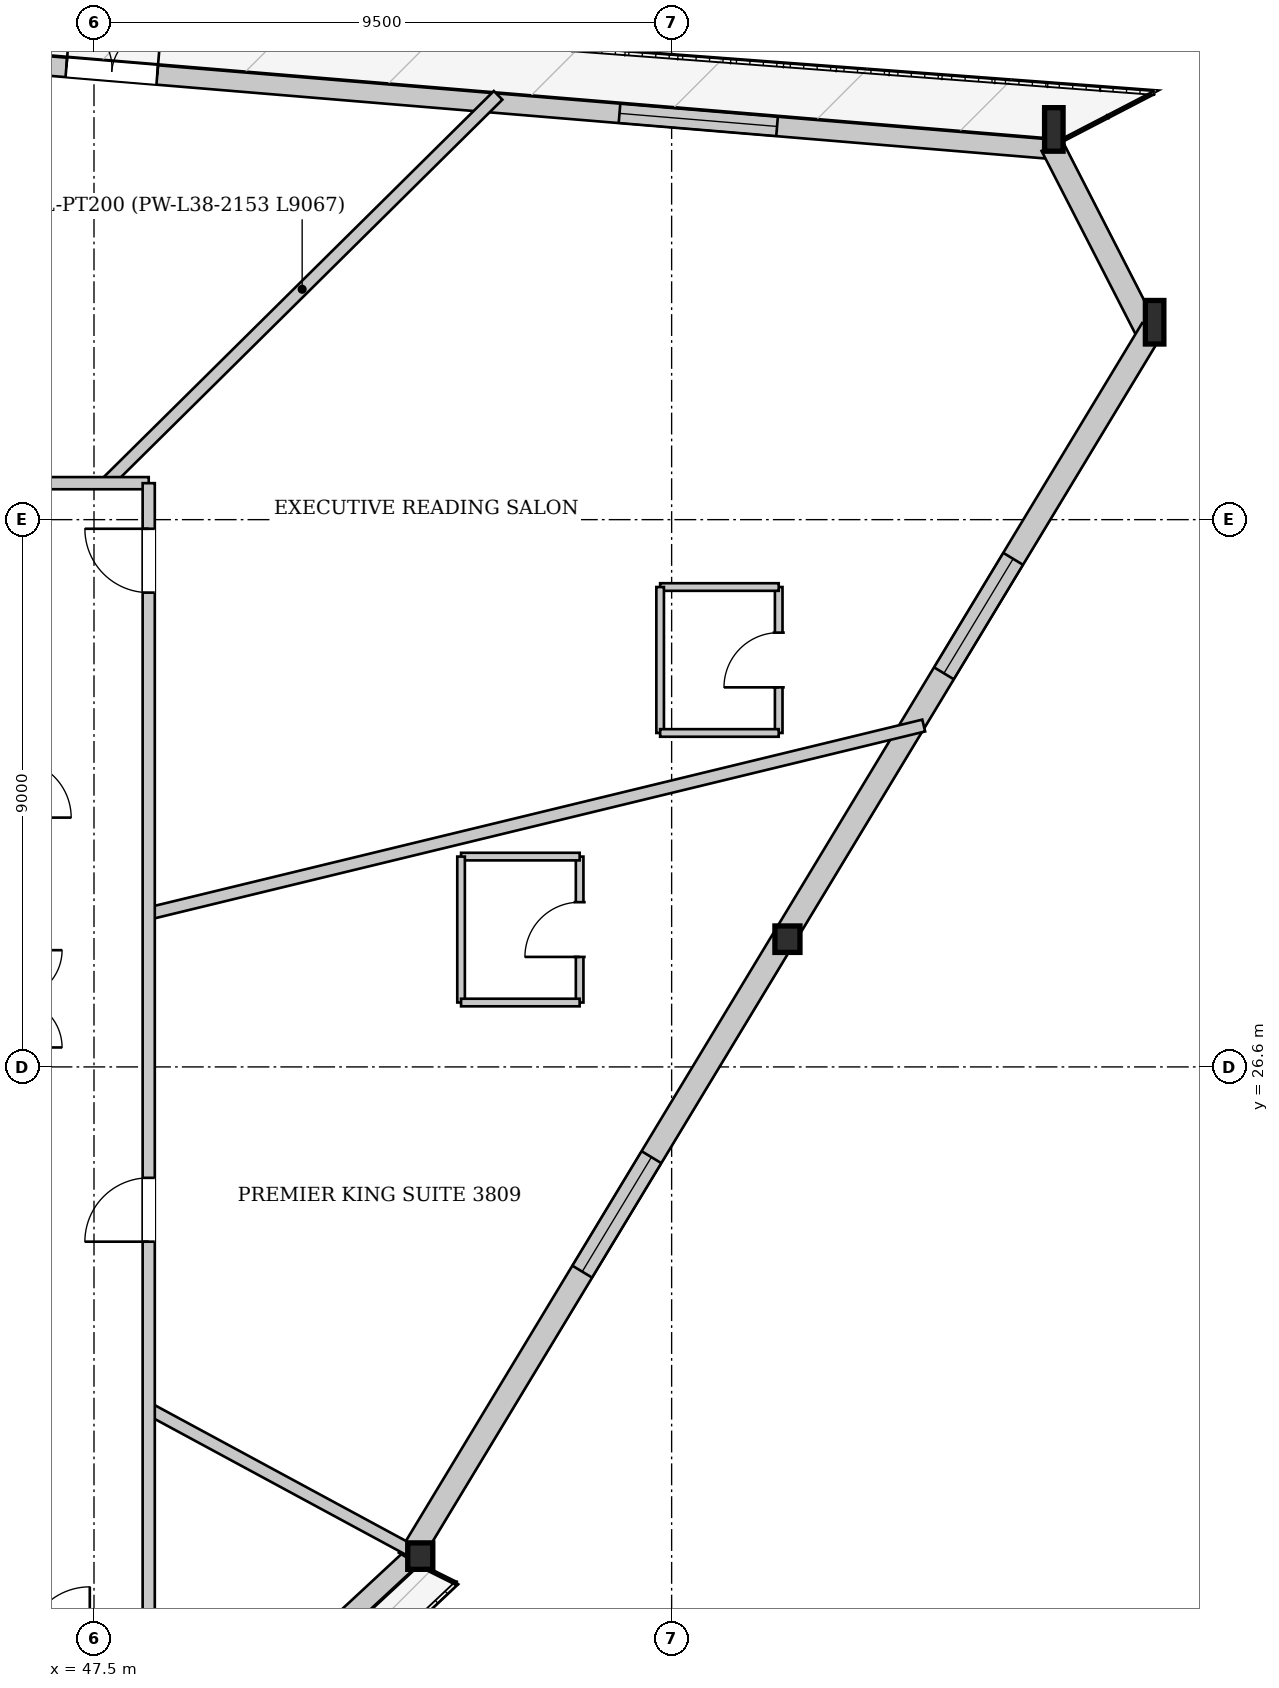
"""IFC4 building model, lengths in metres.
Left out: names, types, materials, properties, quantities, classifications, styles, units other than length and angle.
Written with IfcOpenShell. Run it as: python <this file> out.ifc"""

import sys

from ifc_helpers import new_model, si_unit, direction, frame, frame_2d, origin, origin_2d, place, context, subcontext, project, spatial, rectangle, i_section, extrude, source, transform, mapped, element, fill, save


model = new_model("IFC4")
c1 = context("Model", 3, precision=1e-05, world=origin(), true_north=direction((0.0, 1.0)))
c2 = subcontext(c1, "Body", "Model", "MODEL_VIEW")
j1 = project(units=[si_unit("LENGTHUNIT", "METRE"), si_unit("PLANEANGLEUNIT", "RADIAN")], contexts=[c1])
p1 = place(None, origin())
s1 = spatial("IfcSite", under=j1, at=p1, CompositionType="ELEMENT")
p2 = place(p1, origin())
s2 = spatial("IfcBuilding", under=s1, at=p2, CompositionType="ELEMENT")
p3 = place(p2, frame((0.0, 0.0, 146.6)))
s3 = spatial("IfcBuildingStorey", under=s2, at=p3, CompositionType="ELEMENT", Elevation=146.6)
m1 = source(origin(), c2, "Body", "SweptSolid", [
    extrude(i_section(OverallWidth=0.304, OverallDepth=0.716, WebThickness=0.021, FlangeThickness=0.04, at=origin_2d()), origin(), (0.0, 0.0, 1.0), 3.419),
])
p4 = place(p3, frame((65.063, 38.637, 0.0), z_axis=(-0.070258016221, 0.122594526272, 0.989966864741), x_axis=(-0.867620537636, -0.497226912658, 0.0)))
e1 = element("IfcColumn", 1, at=p4, inside=s3, PredefinedType="COLUMN", context=c2, shape_type="MappedRepresentation", body=[
    mapped(m1, transform((0.0, 0.0, 0.0), x_axis=(1.0, 0.0, 0.0), y_axis=(0.0, 1.0, 0.0), z_axis=(0.0, 0.0, 1.0), scale=1.0)),
])
m2 = source(origin(), c2, "Body", "SweptSolid", [
    extrude(i_section(OverallWidth=0.304, OverallDepth=0.716, WebThickness=0.021, FlangeThickness=0.04, at=origin_2d()), origin(), (0.0, 0.0, 1.0), 3.415),
])
p5 = place(p3, frame((63.422, 41.837, 0.0), z_axis=(-0.079785459835, 0.105236735552, 0.991241398394), x_axis=(-0.796871005575, -0.604149485205, 0.0)))
e2 = element("IfcColumn", 2, at=p5, inside=s3, PredefinedType="COLUMN", context=c2, shape_type="MappedRepresentation", body=[
    mapped(m2, transform((0.0, 0.0, 0.0), x_axis=(1.0, 0.0, 0.0), y_axis=(0.0, 1.0, 0.0), z_axis=(0.0, 0.0, 1.0), scale=1.0)),
])
m3 = source(origin(), c2, "Body", "SweptSolid", [
    extrude(i_section(OverallWidth=0.412, OverallDepth=0.435, WebThickness=0.031, FlangeThickness=0.05, at=origin_2d()), origin(), (0.0, 0.0, 1.0), 3.397),
])
p6 = place(p3, frame((52.839, 18.415, 0.0), z_axis=(0.016098414869, 0.082648112052, 0.996448759652), x_axis=(-0.981553147676, 0.191189482678, 0.0)))
e3 = element("IfcColumn", 3, at=p6, inside=s3, PredefinedType="COLUMN", context=c2, shape_type="MappedRepresentation", body=[
    mapped(m3, transform((0.0, 0.0, 0.0), x_axis=(1.0, 0.0, 0.0), y_axis=(0.0, 1.0, 0.0), z_axis=(0.0, 0.0, 1.0), scale=1.0)),
])
m4 = source(origin(), c2, "Body", "SweptSolid", [
    extrude(i_section(OverallWidth=0.412, OverallDepth=0.435, WebThickness=0.031, FlangeThickness=0.05, at=origin_2d()), origin(), (0.0, 0.0, 1.0), 3.404),
])
p7 = place(p3, frame((58.951, 28.526, 0.0), z_axis=(-0.027251595149, 0.102838914326, 0.994324649328), x_axis=(-0.966636531307, -0.256151939956, 0.0)))
e4 = element("IfcColumn", 4, at=p7, inside=s3, PredefinedType="COLUMN", context=c2, shape_type="MappedRepresentation", body=[
    mapped(m4, transform((0.0, 0.0, 0.0), x_axis=(1.0, 0.0, 0.0), y_axis=(0.0, 1.0, 0.0), z_axis=(0.0, 0.0, 1.0), scale=1.0)),
])
p8 = place(p3, frame((52.73, 18.532, 0.0), z_axis=(0.0, 0.0, 1.0), x_axis=(-0.73309626957, -0.680124885255, 0.0)))
e5 = element("IfcWall", 5, at=p8, inside=s3, PredefinedType="SOLIDWALL", context=c2, shape_type="SweptSolid", body=[
    extrude(rectangle(XDim=23.63, YDim=0.32, at=frame_2d((11.815, 0.0))), origin(), (0.0, 0.0, 1.0), 2.692),
])
p9 = place(p8, frame((6.812, 0.0, 0.0)))
e6 = element("IfcOpeningElement", 6, at=p9, cuts=e5, PredefinedType="OPENING", context=c2, shape_type="SweptSolid", body=[
    extrude(rectangle(XDim=1.5, YDim=2.3, at=frame_2d((0.75, 1.15))), frame((0.0, 0.17, 0.0), z_axis=(0.0, -1.0, 0.0), x_axis=(1.0, 0.0, 0.0)), (0.0, 0.0, 1.0), 0.34),
])
p10 = place(p8, frame((16.186, 0.0, 0.25)))
e7 = element("IfcOpeningElement", 7, at=p10, cuts=e5, PredefinedType="OPENING", context=c2, shape_type="SweptSolid", body=[
    extrude(rectangle(XDim=2.6, YDim=2.35, at=frame_2d((1.3, 1.175))), frame((0.0, 0.17, 0.0), z_axis=(0.0, -1.0, 0.0), x_axis=(1.0, 0.0, 0.0)), (0.0, 0.0, 1.0), 0.34),
])
p11 = place(p3, frame((40.444, 43.585, 0.0), z_axis=(0.0, 0.0, 1.0), x_axis=(0.996570046252, -0.08275350695, 0.0)))
e8 = element("IfcWall", 8, at=p11, inside=s3, PredefinedType="SOLIDWALL", context=c2, shape_type="SweptSolid", body=[
    extrude(rectangle(XDim=23.044, YDim=0.32, at=frame_2d((11.522, 0.0))), origin(), (0.0, 0.0, 1.0), 2.692),
])
p12 = place(p11, frame((6.624, 0.0, 0.0)))
e9 = element("IfcOpeningElement", 9, at=p12, cuts=e8, PredefinedType="OPENING", context=c2, shape_type="SweptSolid", body=[
    extrude(rectangle(XDim=1.5, YDim=2.3, at=frame_2d((0.75, 1.15))), frame((0.0, 0.17, 0.0), z_axis=(0.0, -1.0, 0.0), x_axis=(1.0, 0.0, 0.0)), (0.0, 0.0, 1.0), 0.34),
])
p13 = place(p11, frame((15.753, 0.0, 0.25)))
e10 = element("IfcOpeningElement", 10, at=p13, cuts=e8, PredefinedType="OPENING", context=c2, shape_type="SweptSolid", body=[
    extrude(rectangle(XDim=2.6, YDim=2.35, at=frame_2d((1.3, 1.175))), frame((0.0, 0.17, 0.0), z_axis=(0.0, -1.0, 0.0), x_axis=(1.0, 0.0, 0.0)), (0.0, 0.0, 1.0), 0.34),
])
p14 = place(p3, frame((63.253, 41.751, 0.0), z_axis=(0.0, 0.0, 1.0), x_axis=(0.456338692797, -0.889806157237, 0.0)))
e11 = element("IfcWall", 11, at=p14, inside=s3, PredefinedType="SOLIDWALL", context=c2, shape_type="SweptSolid", body=[
    extrude(rectangle(XDim=3.597, YDim=0.38, at=frame_2d((1.799, 0.0))), origin(), (0.0, 0.0, 1.0), 2.692),
])
p15 = place(p3, frame((64.901, 38.735, 0.0), z_axis=(0.0, 0.0, 1.0), x_axis=(-0.517346318523, -0.855776131188, 0.0)))
e12 = element("IfcWall", 12, at=p15, inside=s3, PredefinedType="SOLIDWALL", context=c2, shape_type="SweptSolid", body=[
    extrude(rectangle(XDim=23.63, YDim=0.38, at=frame_2d((11.815, 0.0))), origin(), (0.0, 0.0, 1.0), 2.692),
])
p16 = place(p15, frame((4.416, 0.0, 0.322)))
e13 = element("IfcOpeningElement", 13, at=p16, cuts=e12, PredefinedType="OPENING", context=c2, shape_type="SweptSolid", body=[
    extrude(rectangle(XDim=2.2, YDim=2.25, at=frame_2d((1.1, 1.125))), frame((0.0, 0.2, 0.0), z_axis=(0.0, -1.0, 0.0), x_axis=(1.0, 0.0, 0.0)), (0.0, 0.0, 1.0), 0.4),
])
p17 = place(p15, frame((15.914, 0.0, 0.322)))
e14 = element("IfcOpeningElement", 14, at=p17, cuts=e12, PredefinedType="OPENING", context=c2, shape_type="SweptSolid", body=[
    extrude(rectangle(XDim=2.2, YDim=2.25, at=frame_2d((1.1, 1.125))), frame((0.0, 0.2, 0.0), z_axis=(0.0, -1.0, 0.0), x_axis=(1.0, 0.0, 0.0)), (0.0, 0.0, 1.0), 0.4),
])
p18 = place(p3, frame((47.701, 36.2, 0.0), z_axis=(0.0, 0.0, 1.0), x_axis=(0.710799449418, 0.703394727523, 0.0)))
e15 = element("IfcWall", 15, at=p18, inside=s3, PredefinedType="PARTITIONING", context=c2, shape_type="SweptSolid", body=[
    extrude(rectangle(XDim=9.067, YDim=0.2, at=frame_2d((4.533, 0.0))), origin(), (0.0, 0.0, 1.0), 3.3),
])
p19 = place(p3, frame((48.4, 20.978, 0.0), z_axis=(0.0, 0.0, 1.0), x_axis=(0.879687571987, -0.475552074638, 0.0)))
e16 = element("IfcWall", 16, at=p19, inside=s3, PredefinedType="PARTITIONING", context=c2, shape_type="SweptSolid", body=[
    extrude(rectangle(XDim=5.101, YDim=0.2, at=frame_2d((2.55, 0.0))), origin(), (0.0, 0.0, 1.0), 2.835),
])
p20 = place(p3, frame((48.4, 29.123, 0.0), z_axis=(0.0, 0.0, 1.0), x_axis=(0.971821296389, 0.235718832267, 0.0)))
e17 = element("IfcWall", 17, at=p20, inside=s3, PredefinedType="PARTITIONING", context=c2, shape_type="SweptSolid", body=[
    extrude(rectangle(XDim=13.115, YDim=0.2, at=frame_2d((6.558, 0.0))), origin(), (0.0, 0.0, 1.0), 3.3),
])
p21 = place(p3, frame((55.487, 27.659, 0.0), z_axis=(0.0, 0.0, 1.0), x_axis=(0.0, 1.0, 0.0)))
e18 = element("IfcWall", 18, at=p21, inside=s3, PredefinedType="PARTITIONING", context=c2, shape_type="SweptSolid", body=[
    extrude(rectangle(XDim=2.4, YDim=0.125, at=frame_2d((1.2, 0.0))), origin(), (0.0, 0.0, 1.0), 3.3),
])
p22 = place(p21, frame((0.75, 0.0, 0.0)))
e19 = element("IfcOpeningElement", 19, at=p22, cuts=e18, PredefinedType="OPENING", context=c2, shape_type="SweptSolid", body=[
    extrude(rectangle(XDim=0.9, YDim=2.1, at=frame_2d((0.45, 1.05))), frame((0.0, 0.073, 0.0), z_axis=(0.0, -1.0, 0.0), x_axis=(1.0, 0.0, 0.0)), (0.0, 0.0, 1.0), 0.145),
])
p23 = place(p3, frame((55.487, 30.059, 0.0), z_axis=(0.0, 0.0, 1.0), x_axis=(-1.0, 0.0, 0.0)))
e20 = element("IfcWall", 20, at=p23, inside=s3, PredefinedType="PARTITIONING", context=c2, shape_type="SweptSolid", body=[
    extrude(rectangle(XDim=1.95, YDim=0.125, at=frame_2d((0.975, 0.0))), origin(), (0.0, 0.0, 1.0), 3.3),
])
p24 = place(p3, frame((53.537, 30.059, 0.0), z_axis=(0.0, 0.0, 1.0), x_axis=(0.0, -1.0, 0.0)))
e21 = element("IfcWall", 21, at=p24, inside=s3, PredefinedType="PARTITIONING", context=c2, shape_type="SweptSolid", body=[
    extrude(rectangle(XDim=2.4, YDim=0.125, at=frame_2d((1.2, 0.0))), origin(), (0.0, 0.0, 1.0), 3.3),
])
p25 = place(p3, frame((53.537, 27.659, 0.0), z_axis=(0.0, 0.0, 1.0), x_axis=(1.0, 0.0, 0.0)))
e22 = element("IfcWall", 22, at=p25, inside=s3, PredefinedType="PARTITIONING", context=c2, shape_type="SweptSolid", body=[
    extrude(rectangle(XDim=1.95, YDim=0.125, at=frame_2d((0.975, 0.0))), origin(), (0.0, 0.0, 1.0), 3.3),
])
p26 = place(p3, frame((58.761, 32.092, 0.0), z_axis=(0.0, 0.0, 1.0), x_axis=(0.0, 1.0, 0.0)))
e23 = element("IfcWall", 23, at=p26, inside=s3, PredefinedType="PARTITIONING", context=c2, shape_type="SweptSolid", body=[
    extrude(rectangle(XDim=2.4, YDim=0.125, at=frame_2d((1.2, 0.0))), origin(), (0.0, 0.0, 1.0), 3.3),
])
p27 = place(p26, frame((0.75, 0.0, 0.0)))
e24 = element("IfcOpeningElement", 24, at=p27, cuts=e23, PredefinedType="OPENING", context=c2, shape_type="SweptSolid", body=[
    extrude(rectangle(XDim=0.9, YDim=2.1, at=frame_2d((0.45, 1.05))), frame((0.0, 0.073, 0.0), z_axis=(0.0, -1.0, 0.0), x_axis=(1.0, 0.0, 0.0)), (0.0, 0.0, 1.0), 0.145),
])
p28 = place(p3, frame((58.761, 34.492, 0.0), z_axis=(0.0, 0.0, 1.0), x_axis=(-1.0, 0.0, 0.0)))
e25 = element("IfcWall", 25, at=p28, inside=s3, PredefinedType="PARTITIONING", context=c2, shape_type="SweptSolid", body=[
    extrude(rectangle(XDim=1.95, YDim=0.125, at=frame_2d((0.975, 0.0))), origin(), (0.0, 0.0, 1.0), 3.3),
])
p29 = place(p3, frame((56.811, 34.492, 0.0), z_axis=(0.0, 0.0, 1.0), x_axis=(0.0, -1.0, 0.0)))
e26 = element("IfcWall", 26, at=p29, inside=s3, PredefinedType="PARTITIONING", context=c2, shape_type="SweptSolid", body=[
    extrude(rectangle(XDim=2.4, YDim=0.125, at=frame_2d((1.2, 0.0))), origin(), (0.0, 0.0, 1.0), 3.3),
])
p30 = place(p3, frame((56.811, 32.092, 0.0), z_axis=(0.0, 0.0, 1.0), x_axis=(1.0, 0.0, 0.0)))
e27 = element("IfcWall", 27, at=p30, inside=s3, PredefinedType="PARTITIONING", context=c2, shape_type="SweptSolid", body=[
    extrude(rectangle(XDim=1.95, YDim=0.125, at=frame_2d((0.975, 0.0))), origin(), (0.0, 0.0, 1.0), 3.3),
])
p31 = place(p3, frame((43.4, 36.2, 0.0), z_axis=(0.0, 0.0, 1.0), x_axis=(1.0, 0.0, 0.0)))
e28 = element("IfcWall", 28, at=p31, inside=s3, PredefinedType="PARTITIONING", context=c2, shape_type="SweptSolid", body=[
    extrude(rectangle(XDim=5.0, YDim=0.2, at=frame_2d((2.5, 0.0))), origin(), (0.0, 0.0, 1.0), 3.3),
])
p32 = place(p31, frame((1.675, 0.0, 0.0)))
e29 = element("IfcOpeningElement", 29, at=p32, cuts=e28, PredefinedType="OPENING", context=c2, shape_type="SweptSolid", body=[
    extrude(rectangle(XDim=1.05, YDim=2.2, at=frame_2d((0.525, 1.1))), frame((0.0, 0.11, 0.0), z_axis=(0.0, -1.0, 0.0), x_axis=(1.0, 0.0, 0.0)), (0.0, 0.0, 1.0), 0.22),
])
p33 = place(p3, frame((48.4, 17.0, 0.0), z_axis=(0.0, 0.0, 1.0), x_axis=(0.0, 1.0, 0.0)))
e30 = element("IfcWall", 30, at=p33, inside=s3, PredefinedType="PARTITIONING", context=c2, shape_type="SweptSolid", body=[
    extrude(rectangle(XDim=19.2, YDim=0.2, at=frame_2d((9.6, 0.0))), origin(), (0.0, 0.0, 1.0), 3.3),
])
p34 = place(p33, frame((6.726, 0.0, 0.0)))
e31 = element("IfcOpeningElement", 31, at=p34, cuts=e30, PredefinedType="OPENING", context=c2, shape_type="SweptSolid", body=[
    extrude(rectangle(XDim=1.05, YDim=2.2, at=frame_2d((0.525, 1.1))), frame((0.0, 0.11, 0.0), z_axis=(0.0, -1.0, 0.0), x_axis=(1.0, 0.0, 0.0)), (0.0, 0.0, 1.0), 0.22),
])
p35 = place(p33, frame((17.4, 0.0, 0.0)))
e32 = element("IfcOpeningElement", 32, at=p35, cuts=e30, PredefinedType="OPENING", context=c2, shape_type="SweptSolid", body=[
    extrude(rectangle(XDim=1.05, YDim=2.2, at=frame_2d((0.525, 1.1))), frame((0.0, 0.11, 0.0), z_axis=(0.0, -1.0, 0.0), x_axis=(1.0, 0.0, 0.0)), (0.0, 0.0, 1.0), 0.22),
])
m5 = source(origin(), c2, "Body", "SweptSolid", [
    extrude(rectangle(XDim=1.5, YDim=2.3, at=frame_2d((0.75, 1.15))), frame((0.0, 0.025, 0.0), z_axis=(0.0, -1.0, 0.0), x_axis=(1.0, 0.0, 0.0)), (0.0, 0.0, 1.0), 0.05),
])
p36 = place(p12, origin())
e33 = element("IfcDoor", 33, at=p36, inside=s3, OperationType="DOUBLE_DOOR_SINGLE_SWING", PredefinedType="DOOR", context=c2, shape_type="MappedRepresentation", body=[
    mapped(m5, transform((0.0, 0.0, 0.0), x_axis=(1.0, 0.0, 0.0), y_axis=(0.0, 1.0, 0.0), z_axis=(0.0, 0.0, 1.0), scale=1.0)),
])
fill(e9, e33)
m6 = source(origin(), c2, "Body", "SweptSolid", [
    extrude(rectangle(XDim=2.6, YDim=2.35, at=frame_2d((1.3, 1.175))), frame((0.0, 0.03, 0.0), z_axis=(0.0, -1.0, 0.0), x_axis=(1.0, 0.0, 0.0)), (0.0, 0.0, 1.0), 0.06),
])
p37 = place(p13, origin())
e34 = element("IfcWindow", 34, at=p37, inside=s3, PartitioningType="SINGLE_PANEL", PredefinedType="WINDOW", context=c2, shape_type="MappedRepresentation", body=[
    mapped(m6, transform((0.0, 0.0, 0.0), x_axis=(1.0, 0.0, 0.0), y_axis=(0.0, 1.0, 0.0), z_axis=(0.0, 0.0, 1.0), scale=1.0)),
])
fill(e10, e34)
m7 = source(origin(), c2, "Body", "SweptSolid", [
    extrude(rectangle(XDim=2.2, YDim=2.25, at=frame_2d((1.1, 1.125))), frame((0.0, 0.03, 0.0), z_axis=(0.0, -1.0, 0.0), x_axis=(1.0, 0.0, 0.0)), (0.0, 0.0, 1.0), 0.06),
])
p38 = place(p16, origin())
e35 = element("IfcWindow", 35, at=p38, inside=s3, PartitioningType="SINGLE_PANEL", PredefinedType="WINDOW", context=c2, shape_type="MappedRepresentation", body=[
    mapped(m7, transform((0.0, 0.0, 0.0), x_axis=(1.0, 0.0, 0.0), y_axis=(0.0, 1.0, 0.0), z_axis=(0.0, 0.0, 1.0), scale=1.0)),
])
fill(e13, e35)
p39 = place(p17, origin())
e36 = element("IfcWindow", 36, at=p39, inside=s3, PartitioningType="SINGLE_PANEL", PredefinedType="WINDOW", context=c2, shape_type="MappedRepresentation", body=[
    mapped(m7, transform((0.0, 0.0, 0.0), x_axis=(1.0, 0.0, 0.0), y_axis=(0.0, 1.0, 0.0), z_axis=(0.0, 0.0, 1.0), scale=1.0)),
])
fill(e14, e36)
m8 = source(origin(), c2, "Body", "SweptSolid", [
    extrude(rectangle(XDim=0.9, YDim=2.1, at=frame_2d((0.45, 1.05))), frame((0.0, 0.025, 0.0), z_axis=(0.0, -1.0, 0.0), x_axis=(1.0, 0.0, 0.0)), (0.0, 0.0, 1.0), 0.05),
])
p40 = place(p22, origin())
e37 = element("IfcDoor", 37, at=p40, inside=s3, OperationType="SINGLE_SWING_LEFT", PredefinedType="DOOR", context=c2, shape_type="MappedRepresentation", body=[
    mapped(m8, transform((0.0, 0.0, 0.0), x_axis=(1.0, 0.0, 0.0), y_axis=(0.0, 1.0, 0.0), z_axis=(0.0, 0.0, 1.0), scale=1.0)),
])
fill(e19, e37)
p41 = place(p27, origin())
e38 = element("IfcDoor", 38, at=p41, inside=s3, OperationType="SINGLE_SWING_LEFT", PredefinedType="DOOR", context=c2, shape_type="MappedRepresentation", body=[
    mapped(m8, transform((0.0, 0.0, 0.0), x_axis=(1.0, 0.0, 0.0), y_axis=(0.0, 1.0, 0.0), z_axis=(0.0, 0.0, 1.0), scale=1.0)),
])
fill(e24, e38)
m9 = source(origin(), c2, "Body", "SweptSolid", [
    extrude(rectangle(XDim=1.05, YDim=2.2, at=frame_2d((0.525, 1.1))), frame((0.0, 0.025, 0.0), z_axis=(0.0, -1.0, 0.0), x_axis=(1.0, 0.0, 0.0)), (0.0, 0.0, 1.0), 0.05),
])
p42 = place(p34, origin())
e39 = element("IfcDoor", 39, at=p42, inside=s3, OperationType="SINGLE_SWING_LEFT", PredefinedType="DOOR", context=c2, shape_type="MappedRepresentation", body=[
    mapped(m9, transform((0.0, 0.0, 0.0), x_axis=(1.0, 0.0, 0.0), y_axis=(0.0, 1.0, 0.0), z_axis=(0.0, 0.0, 1.0), scale=1.0)),
])
fill(e31, e39)
p43 = place(p35, origin())
e40 = element("IfcDoor", 40, at=p43, inside=s3, OperationType="SINGLE_SWING_RIGHT", PredefinedType="DOOR", context=c2, shape_type="MappedRepresentation", body=[
    mapped(m9, transform((0.0, 0.0, 0.0), x_axis=(1.0, 0.0, 0.0), y_axis=(0.0, 1.0, 0.0), z_axis=(0.0, 0.0, 1.0), scale=1.0)),
])
fill(e32, e40)
save(model, sys.argv[1])
